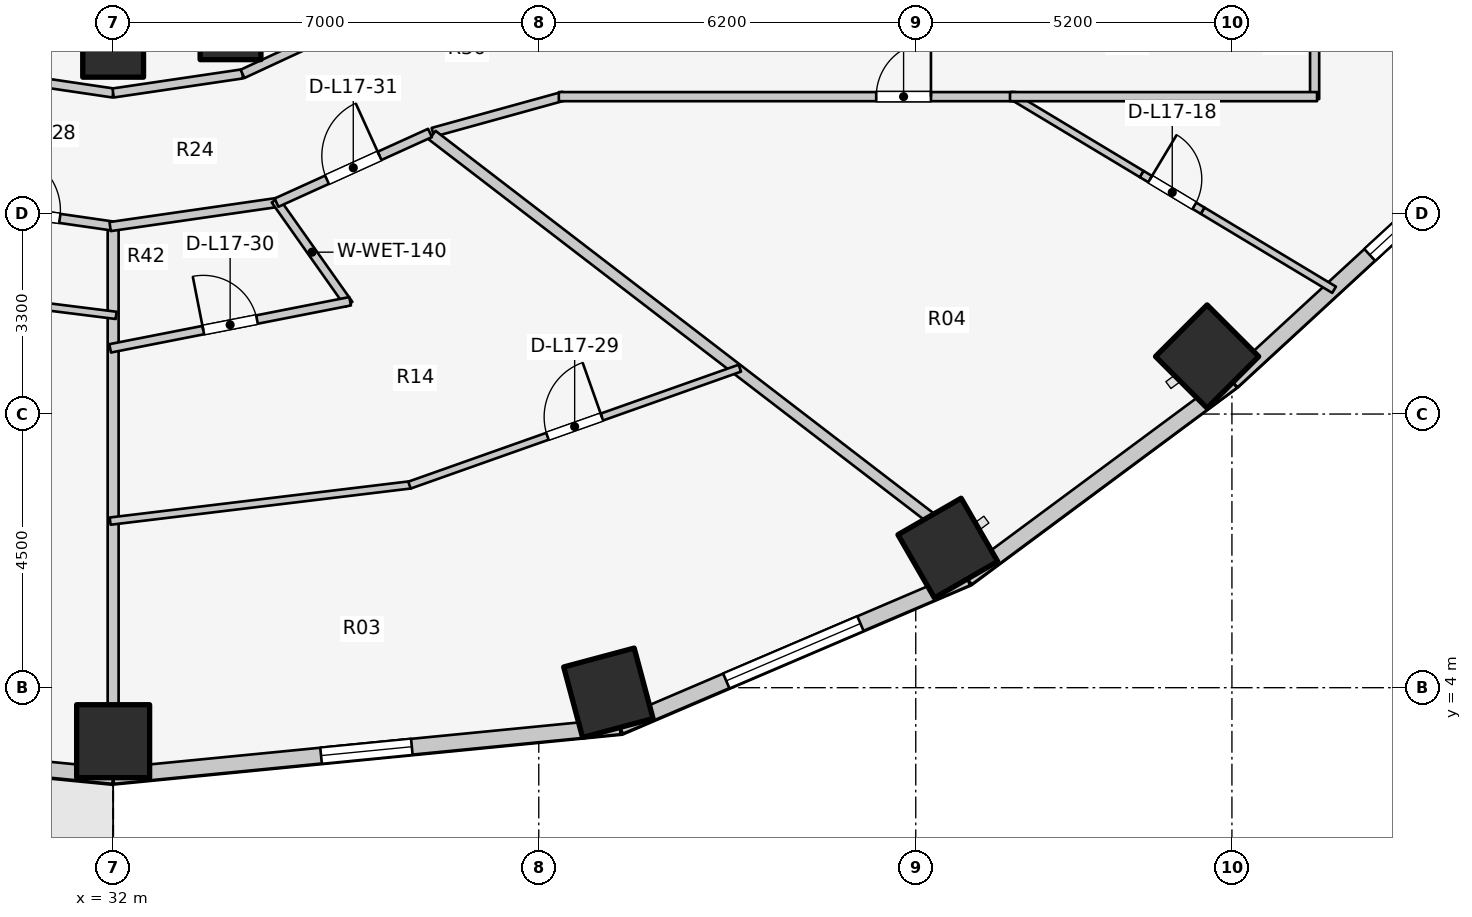
"""IFC4 building model, lengths in metres.
Left out: names, types, materials, properties, quantities, classifications, styles, units other than length and angle.
Written with IfcOpenShell. Run it as: python <this file> out.ifc"""

import sys

from ifc_helpers import new_model, si_unit, direction, frame, frame_2d, origin, origin_2d, place, context, subcontext, project, spatial, rectangle, extrude, element, fill, save


model = new_model("IFC4")
c1 = context("Model", 3, precision=1e-05, world=origin(), true_north=direction((0.0, 1.0)))
c2 = subcontext(c1, "Body", "Model", "MODEL_VIEW")
j1 = project(units=[si_unit("LENGTHUNIT", "METRE"), si_unit("PLANEANGLEUNIT", "RADIAN")], contexts=[c1])
p1 = place(None, origin())
s1 = spatial("IfcSite", under=j1, at=p1, CompositionType="ELEMENT")
p2 = place(p1, origin())
s2 = spatial("IfcBuilding", under=s1, at=p2, CompositionType="ELEMENT")
p3 = place(p2, frame((0.0, 0.0, 58.6)))
s3 = spatial("IfcBuildingStorey", under=s2, at=p3, CompositionType="ELEMENT", Elevation=58.6)
p4 = place(p3, frame((32.0, 14.54, 0.0), z_axis=(0.0, 0.0, 1.0), x_axis=(1.0, 0.0, 0.0)))
e1 = element("IfcColumn", 1, at=p4, inside=s3, PredefinedType="COLUMN", context=c2, shape_type="SweptSolid", body=[
    extrude(rectangle(XDim=1.0, YDim=1.0, at=origin_2d()), origin(), (0.0, 0.0, 1.0), 3.1),
])
p5 = place(p3, frame((32.0, 3.12, 0.0), z_axis=(0.0, 0.0, 1.0), x_axis=(0.0, -1.0, 0.0)))
e2 = element("IfcColumn", 2, at=p5, inside=s3, PredefinedType="COLUMN", context=c2, shape_type="SweptSolid", body=[
    extrude(rectangle(XDim=1.2, YDim=1.2, at=origin_2d()), origin(), (0.0, 0.0, 1.0), 3.1),
])
p6 = place(p3, frame((33.931, 14.828, 0.0), z_axis=(0.0, 0.0, 1.0), x_axis=(1.0, 0.0, 0.0)))
e3 = element("IfcColumn", 3, at=p6, inside=s3, PredefinedType="COLUMN", context=c2, shape_type="SweptSolid", body=[
    extrude(rectangle(XDim=1.0, YDim=1.0, at=origin_2d()), origin(), (0.0, 0.0, 1.0), 3.1),
])
for number, where, z_axis, x_axis in (
    (4, (40.145, 3.916, 0.0), (0.0, 0.0, 1.0), (0.259, -0.966, 0.0)),
    (5, (45.727, 6.296, 0.0), (0.0, 0.0, 1.0), (0.5, -0.866, 0.0)),
    (6, (49.992, 9.446, 0.0), (0.0, 0.0, 1.0), (0.707, -0.707, 0.0)),
):
    element("IfcColumn", number, at=place(p3, frame(where, z_axis=z_axis, x_axis=x_axis)), inside=s3, PredefinedType="COLUMN", context=c2, shape_type="SweptSolid", body=[
        extrude(rectangle(XDim=1.2, YDim=1.2, at=origin_2d()), origin(), (0.0, 0.0, 1.0), 3.1),
    ])
p7 = place(p3, frame((23.668, 3.364, 0.0), z_axis=(0.0, 0.0, 1.0), x_axis=(0.995247718352, -0.097375454379, 0.0)))
e7 = element("IfcWall", 7, at=p7, inside=s3, PredefinedType="STANDARD", context=c2, shape_type="SweptSolid", body=[
    extrude(rectangle(XDim=8.372, YDim=0.26, at=frame_2d((4.186, 0.0))), origin(), (0.0, 0.0, 1.0), 2.88),
])
p8 = place(p7, frame((3.586, 0.0, 0.0)))
e8 = element("IfcOpeningElement", 8, at=p8, cuts=e7, PredefinedType="OPENING", context=c2, shape_type="SweptSolid", body=[
    extrude(rectangle(XDim=1.2, YDim=2.2, at=frame_2d((0.6, 1.1))), frame((0.0, 0.14, 0.0), z_axis=(0.0, -1.0, 0.0), x_axis=(1.0, 0.0, 0.0)), (0.0, 0.0, 1.0), 0.28),
])
p9 = place(p3, frame((32.0, 2.549, 0.0), z_axis=(0.0, 0.0, 1.0), x_axis=(0.995247718352, 0.097375454379, 0.0)))
e9 = element("IfcWall", 9, at=p9, inside=s3, PredefinedType="STANDARD", context=c2, shape_type="SweptSolid", body=[
    extrude(rectangle(XDim=8.372, YDim=0.26, at=frame_2d((4.186, 0.0))), origin(), (0.0, 0.0, 1.0), 2.85),
])
p10 = place(p9, frame((3.436, 0.0, 0.75)))
e10 = element("IfcOpeningElement", 10, at=p10, cuts=e9, PredefinedType="OPENING", context=c2, shape_type="SweptSolid", body=[
    extrude(rectangle(XDim=1.5, YDim=1.6, at=frame_2d((0.75, 0.8))), frame((0.0, 0.14, 0.0), z_axis=(0.0, -1.0, 0.0), x_axis=(1.0, 0.0, 0.0)), (0.0, 0.0, 1.0), 0.28),
])
p11 = place(p3, frame((40.332, 3.364, 0.0), z_axis=(0.0, 0.0, 1.0), x_axis=(0.919612132394, 0.39282760335, 0.0)))
e11 = element("IfcWall", 11, at=p11, inside=s3, PredefinedType="STANDARD", context=c2, shape_type="SweptSolid", body=[
    extrude(rectangle(XDim=6.209, YDim=0.26, at=frame_2d((3.105, 0.0))), origin(), (0.0, 0.0, 1.0), 2.85),
])
p12 = place(p11, frame((1.905, 0.0, 0.75)))
e12 = element("IfcOpeningElement", 12, at=p12, cuts=e11, PredefinedType="OPENING", context=c2, shape_type="SweptSolid", body=[
    extrude(rectangle(XDim=2.4, YDim=1.7, at=frame_2d((1.2, 0.85))), frame((0.0, 0.14, 0.0), z_axis=(0.0, -1.0, 0.0), x_axis=(1.0, 0.0, 0.0)), (0.0, 0.0, 1.0), 0.28),
])
p13 = place(p3, frame((46.042, 5.803, 0.0), z_axis=(0.0, 0.0, 1.0), x_axis=(0.803477531792, 0.595335078679, 0.0)))
e13 = element("IfcWall", 13, at=p13, inside=s3, PredefinedType="STANDARD", context=c2, shape_type="SweptSolid", body=[
    extrude(rectangle(XDim=5.43, YDim=0.26, at=frame_2d((2.715, 0.0))), origin(), (0.0, 0.0, 1.0), 2.85),
])
p14 = place(p3, frame((50.405, 9.035, 0.0), z_axis=(0.0, 0.0, 1.0), x_axis=(0.735655109293, 0.67735630223, 0.0)))
e14 = element("IfcWall", 14, at=p14, inside=s3, PredefinedType="STANDARD", context=c2, shape_type="SweptSolid", body=[
    extrude(rectangle(XDim=5.151, YDim=0.26, at=frame_2d((2.575, 0.0))), origin(), (0.0, 0.0, 1.0), 2.85),
])
p15 = place(p14, frame((3.074, 0.0, 0.75)))
e15 = element("IfcOpeningElement", 15, at=p15, cuts=e14, PredefinedType="OPENING", context=c2, shape_type="SweptSolid", body=[
    extrude(rectangle(XDim=1.2, YDim=1.5, at=frame_2d((0.6, 0.75))), frame((0.0, 0.14, 0.0), z_axis=(0.0, -1.0, 0.0), x_axis=(1.0, 0.0, 0.0)), (0.0, 0.0, 1.0), 0.28),
])
for number, where, z_axis, x_axis in (
    (16, (29.873, 14.094, 0.0), (0.0, 0.0, 1.0), (0.989, -0.146, 0.0)),
    (17, (32.0, 13.78, 0.0), (0.0, 0.0, 1.0), (0.989, 0.146, 0.0)),
):
    element("IfcWall", number, at=place(p3, frame(where, z_axis=z_axis, x_axis=x_axis)), inside=s3, PredefinedType="PARTITIONING", context=c2, shape_type="SweptSolid", body=[
        extrude(rectangle(XDim=2.151, YDim=0.15, at=frame_2d((1.075, 0.0))), origin(), (0.0, 0.0, 1.0), 2.237),
    ])
p16 = place(p3, frame((34.127, 14.094, 0.0), z_axis=(0.0, 0.0, 1.0), x_axis=(0.906943449489, 0.421252393975, 0.0)))
e18 = element("IfcWall", 18, at=p16, inside=s3, PredefinedType="PARTITIONING", context=c2, shape_type="SweptSolid", body=[
    extrude(rectangle(XDim=2.186, YDim=0.15, at=frame_2d((1.093, 0.0))), origin(), (0.0, 0.0, 1.0), 2.237),
])
p17 = place(p3, frame((51.76, 13.68, 0.0), z_axis=(0.0, 0.0, 1.0), x_axis=(0.0, 1.0, 0.0)))
e19 = element("IfcWall", 19, at=p17, inside=s3, PredefinedType="PARTITIONING", context=c2, shape_type="SweptSolid", body=[
    extrude(rectangle(XDim=3.148, YDim=0.15, at=frame_2d((1.574, 0.0))), origin(), (0.0, 0.0, 1.0), 2.855),
])
p18 = place(p3, frame((46.757, 13.746, 0.0), z_axis=(0.0, 0.0, 1.0), x_axis=(0.856885623316, -0.515506574696, 0.0)))
e20 = element("IfcWall", 20, at=p18, inside=s3, PredefinedType="MOVABLE", context=c2, shape_type="SweptSolid", body=[
    extrude(rectangle(XDim=2.521, YDim=0.12, at=frame_2d((1.26, 0.0))), origin(), (0.0, 0.0, 1.0), 2.855),
])
p19 = place(p3, frame((48.917, 12.446, 0.0), z_axis=(0.0, 0.0, 1.0), x_axis=(0.856958544896, -0.515385343534, 0.0)))
e21 = element("IfcWall", 21, at=p19, inside=s3, PredefinedType="MOVABLE", context=c2, shape_type="SweptSolid", body=[
    extrude(rectangle(XDim=1.17, YDim=0.12, at=frame_2d((0.585, 0.0))), origin(), (0.0, 0.0, 1.0), 2.11),
])
p20 = place(p19, frame((0.16, 0.0, 0.0)))
e22 = element("IfcOpeningElement", 22, at=p20, cuts=e21, PredefinedType="OPENING", context=c2, shape_type="SweptSolid", body=[
    extrude(rectangle(XDim=0.85, YDim=2.05, at=frame_2d((0.425, 1.025))), frame((0.0, 0.07, 0.0), z_axis=(0.0, -1.0, 0.0), x_axis=(1.0, 0.0, 0.0)), (0.0, 0.0, 1.0), 0.14),
])
p21 = place(p3, frame((49.92, 11.843, 0.0), z_axis=(0.0, 0.0, 1.0), x_axis=(0.856902668222, -0.515478241243, 0.0)))
e23 = element("IfcWall", 23, at=p21, inside=s3, PredefinedType="MOVABLE", context=c2, shape_type="SweptSolid", body=[
    extrude(rectangle(XDim=2.521, YDim=0.12, at=frame_2d((1.26, 0.0))), origin(), (0.0, 0.0, 1.0), 2.855),
])
p22 = place(p3, frame((37.258, 13.133, 0.0), z_axis=(0.0, 0.0, 1.0), x_axis=(0.963833843713, 0.266503886865, 0.0)))
e24 = element("IfcWall", 24, at=p22, inside=s3, PredefinedType="PARTITIONING", context=c2, shape_type="SweptSolid", body=[
    extrude(rectangle(XDim=2.232, YDim=0.15, at=frame_2d((1.116, 0.0))), origin(), (0.0, 0.0, 1.0), 2.237),
])
p23 = place(p3, frame((39.33, 13.72, 0.0), z_axis=(0.0, 0.0, 1.0), x_axis=(1.0, 0.0, 0.0)))
e25 = element("IfcWall", 25, at=p23, inside=s3, PredefinedType="PARTITIONING", context=c2, shape_type="SweptSolid", body=[
    extrude(rectangle(XDim=7.52, YDim=0.15, at=frame_2d((3.76, 0.0))), origin(), (0.0, 0.0, 1.0), 2.237),
])
p24 = place(p23, frame((5.22, 0.0, 0.0)))
e26 = element("IfcOpeningElement", 26, at=p24, cuts=e25, PredefinedType="OPENING", context=c2, shape_type="SweptSolid", body=[
    extrude(rectangle(XDim=0.9, YDim=2.1, at=frame_2d((0.45, 1.05))), frame((0.0, 0.085, 0.0), z_axis=(0.0, -1.0, 0.0), x_axis=(1.0, 0.0, 0.0)), (0.0, 0.0, 1.0), 0.17),
])
p25 = place(p3, frame((46.75, 13.72, 0.0), z_axis=(0.0, 0.0, 1.0), x_axis=(1.0, 0.0, 0.0)))
e27 = element("IfcWall", 27, at=p25, inside=s3, PredefinedType="PARTITIONING", context=c2, shape_type="SweptSolid", body=[
    extrude(rectangle(XDim=5.05, YDim=0.15, at=frame_2d((2.525, 0.0))), origin(), (0.0, 0.0, 1.0), 2.069),
])
p26 = place(p3, frame((32.0, 11.535, 0.0), z_axis=(0.0, 0.0, 1.0), x_axis=(0.0, -1.0, 0.0)))
e28 = element("IfcWall", 28, at=p26, inside=s3, PredefinedType="PARTITIONING", context=c2, shape_type="SweptSolid", body=[
    extrude(rectangle(XDim=7.835, YDim=0.18, at=frame_2d((3.917, 0.0))), origin(), (0.0, 0.0, 1.0), 2.237),
])
p27 = place(p3, frame((37.249, 13.085, 0.0), z_axis=(0.0, 0.0, 1.0), x_axis=(0.793181014702, -0.608985942298, 0.0)))
e29 = element("IfcWall", 29, at=p27, inside=s3, PredefinedType="PARTITIONING", context=c2, shape_type="SweptSolid", body=[
    extrude(rectangle(XDim=10.324, YDim=0.18, at=frame_2d((5.162, 0.0))), origin(), (0.0, 0.0, 1.0), 2.237),
])
p28 = place(p3, frame((28.274, 10.596, 0.0), z_axis=(0.0, 0.0, 1.0), x_axis=(0.992245264378, -0.124295355177, 0.0)))
e30 = element("IfcWall", 30, at=p28, inside=s3, PredefinedType="MOVABLE", context=c2, shape_type="SweptSolid", body=[
    extrude(rectangle(XDim=3.805, YDim=0.12, at=frame_2d((1.902, 0.0))), origin(), (0.0, 0.0, 1.0), 2.237),
])
p29 = place(p28, frame((1.427, 0.0, 0.0)))
e31 = element("IfcOpeningElement", 31, at=p29, cuts=e30, PredefinedType="OPENING", context=c2, shape_type="SweptSolid", body=[
    extrude(rectangle(XDim=0.95, YDim=2.1, at=frame_2d((0.475, 1.05))), frame((0.0, 0.07, 0.0), z_axis=(0.0, -1.0, 0.0), x_axis=(1.0, 0.0, 0.0)), (0.0, 0.0, 1.0), 0.14),
])
p30 = place(p3, frame((29.299, 11.981, 0.0), z_axis=(0.0, 0.0, 1.0), x_axis=(0.989748682384, -0.142819976611, 0.0)))
e32 = element("IfcWall", 32, at=p30, inside=s3, PredefinedType="PARTITIONING", context=c2, shape_type="SweptSolid", body=[
    extrude(rectangle(XDim=2.737, YDim=0.15, at=frame_2d((1.368, 0.0))), origin(), (0.0, 0.0, 1.0), 2.237),
])
p31 = place(p30, frame((0.893, 0.0, 0.0)))
e33 = element("IfcOpeningElement", 33, at=p31, cuts=e32, PredefinedType="OPENING", context=c2, shape_type="SweptSolid", body=[
    extrude(rectangle(XDim=0.95, YDim=2.1, at=frame_2d((0.475, 1.05))), frame((0.0, 0.085, 0.0), z_axis=(0.0, -1.0, 0.0), x_axis=(1.0, 0.0, 0.0)), (0.0, 0.0, 1.0), 0.17),
])
p32 = place(p3, frame((31.95, 6.739, 0.0), z_axis=(0.0, 0.0, 1.0), x_axis=(0.992797021108, 0.11980849252, 0.0)))
e34 = element("IfcWall", 34, at=p32, inside=s3, PredefinedType="MOVABLE", context=c2, shape_type="SweptSolid", body=[
    extrude(rectangle(XDim=4.978, YDim=0.12, at=frame_2d((2.489, 0.0))), origin(), (0.0, 0.0, 1.0), 2.237),
])
p33 = place(p3, frame((36.874, 7.331, 0.0), z_axis=(0.0, 0.0, 1.0), x_axis=(0.942698294357, 0.333646408368, 0.0)))
e35 = element("IfcWall", 35, at=p33, inside=s3, PredefinedType="MOVABLE", context=c2, shape_type="SweptSolid", body=[
    extrude(rectangle(XDim=5.764, YDim=0.12, at=frame_2d((2.882, 0.0))), origin(), (0.0, 0.0, 1.0), 2.237),
])
p34 = place(p33, frame((2.407, 0.0, 0.0)))
e36 = element("IfcOpeningElement", 36, at=p34, cuts=e35, PredefinedType="OPENING", context=c2, shape_type="SweptSolid", body=[
    extrude(rectangle(XDim=0.95, YDim=2.1, at=frame_2d((0.475, 1.05))), frame((0.0, 0.07, 0.0), z_axis=(0.0, -1.0, 0.0), x_axis=(1.0, 0.0, 0.0)), (0.0, 0.0, 1.0), 0.14),
])
p35 = place(p3, frame((31.95, 11.583, 0.0), z_axis=(0.0, 0.0, 1.0), x_axis=(0.989761784218, 0.142729150844, 0.0)))
e37 = element("IfcWall", 37, at=p35, inside=s3, PredefinedType="PARTITIONING", context=c2, shape_type="SweptSolid", body=[
    extrude(rectangle(XDim=2.822, YDim=0.15, at=frame_2d((1.411, 0.0))), origin(), (0.0, 0.0, 1.0), 2.237),
])
p36 = place(p3, frame((34.665, 12.02, 0.0), z_axis=(0.0, 0.0, 1.0), x_axis=(0.577139575342, -0.816645523207, 0.0)))
e38 = element("IfcWall", 38, at=p36, inside=s3, PredefinedType="PLUMBINGWALL", context=c2, shape_type="SweptSolid", body=[
    extrude(rectangle(XDim=2.1, YDim=0.14, at=frame_2d((1.05, 0.0))), origin(), (0.0, 0.0, 1.0), 2.855),
])
p37 = place(p3, frame((31.951, 9.58, 0.0), z_axis=(0.0, 0.0, 1.0), x_axis=(0.981274848728, 0.19261274946, 0.0)))
e39 = element("IfcWall", 39, at=p37, inside=s3, PredefinedType="PLUMBINGWALL", context=c2, shape_type="SweptSolid", body=[
    extrude(rectangle(XDim=4.022, YDim=0.14, at=frame_2d((2.011, 0.0))), origin(), (0.0, 0.0, 1.0), 2.237),
])
p38 = place(p37, frame((1.561, 0.0, 0.0)))
e40 = element("IfcOpeningElement", 40, at=p38, cuts=e39, PredefinedType="OPENING", context=c2, shape_type="SweptSolid", body=[
    extrude(rectangle(XDim=0.9, YDim=2.1, at=frame_2d((0.45, 1.05))), frame((0.0, 0.08, 0.0), z_axis=(0.0, -1.0, 0.0), x_axis=(1.0, 0.0, 0.0)), (0.0, 0.0, 1.0), 0.16),
])
p39 = place(p3, frame((34.687, 11.977, 0.0), z_axis=(0.0, 0.0, 1.0), x_axis=(0.910568469686, 0.41335827319, 0.0)))
e41 = element("IfcWall", 41, at=p39, inside=s3, PredefinedType="PARTITIONING", context=c2, shape_type="SweptSolid", body=[
    extrude(rectangle(XDim=2.772, YDim=0.15, at=frame_2d((1.386, 0.0))), origin(), (0.0, 0.0, 1.0), 2.237),
])
p40 = place(p39, frame((0.911, 0.0, 0.0)))
e42 = element("IfcOpeningElement", 42, at=p40, cuts=e41, PredefinedType="OPENING", context=c2, shape_type="SweptSolid", body=[
    extrude(rectangle(XDim=0.95, YDim=2.1, at=frame_2d((0.475, 1.05))), frame((0.0, 0.085, 0.0), z_axis=(0.0, -1.0, 0.0), x_axis=(1.0, 0.0, 0.0)), (0.0, 0.0, 1.0), 0.17),
])
p41 = place(p10, origin())
e43 = element("IfcWindow", 43, at=p41, inside=s3, PartitioningType="SINGLE_PANEL", PredefinedType="WINDOW", context=c2, shape_type="SweptSolid", body=[
    extrude(rectangle(XDim=1.5, YDim=1.6, at=frame_2d((0.75, 0.8))), frame((0.0, 0.03, 0.0), z_axis=(0.0, -1.0, 0.0), x_axis=(1.0, 0.0, 0.0)), (0.0, 0.0, 1.0), 0.06),
])
fill(e10, e43)
p42 = place(p12, origin())
e44 = element("IfcWindow", 44, at=p42, inside=s3, PartitioningType="SINGLE_PANEL", PredefinedType="WINDOW", context=c2, shape_type="SweptSolid", body=[
    extrude(rectangle(XDim=2.4, YDim=1.7, at=frame_2d((1.2, 0.85))), frame((0.0, 0.03, 0.0), z_axis=(0.0, -1.0, 0.0), x_axis=(1.0, 0.0, 0.0)), (0.0, 0.0, 1.0), 0.06),
])
fill(e12, e44)
p43 = place(p15, origin())
e45 = element("IfcWindow", 45, at=p43, inside=s3, PartitioningType="SINGLE_PANEL", PredefinedType="WINDOW", context=c2, shape_type="SweptSolid", body=[
    extrude(rectangle(XDim=1.2, YDim=1.5, at=frame_2d((0.6, 0.75))), frame((0.0, 0.03, 0.0), z_axis=(0.0, -1.0, 0.0), x_axis=(1.0, 0.0, 0.0)), (0.0, 0.0, 1.0), 0.06),
])
fill(e15, e45)
p44 = place(p20, origin())
e46 = element("IfcDoor", 46, at=p44, inside=s3, OperationType="SINGLE_SWING_LEFT", PredefinedType="DOOR", context=c2, shape_type="SweptSolid", body=[
    extrude(rectangle(XDim=0.85, YDim=2.05, at=frame_2d((0.425, 1.025))), frame((0.0, 0.025, 0.0), z_axis=(0.0, -1.0, 0.0), x_axis=(1.0, 0.0, 0.0)), (0.0, 0.0, 1.0), 0.05),
])
fill(e22, e46)
p45 = place(p24, origin())
e47 = element("IfcDoor", 47, at=p45, inside=s3, OperationType="SINGLE_SWING_RIGHT", PredefinedType="DOOR", context=c2, shape_type="SweptSolid", body=[
    extrude(rectangle(XDim=0.9, YDim=2.1, at=frame_2d((0.45, 1.05))), frame((0.0, 0.025, 0.0), z_axis=(0.0, -1.0, 0.0), x_axis=(1.0, 0.0, 0.0)), (0.0, 0.0, 1.0), 0.05),
])
fill(e26, e47)
p46 = place(p31, origin())
e48 = element("IfcDoor", 48, at=p46, inside=s3, OperationType="SINGLE_SWING_LEFT", PredefinedType="DOOR", context=c2, shape_type="SweptSolid", body=[
    extrude(rectangle(XDim=0.95, YDim=2.1, at=frame_2d((0.475, 1.05))), frame((0.0, 0.025, 0.0), z_axis=(0.0, -1.0, 0.0), x_axis=(1.0, 0.0, 0.0)), (0.0, 0.0, 1.0), 0.05),
])
fill(e33, e48)
p47 = place(p34, origin())
e49 = element("IfcDoor", 49, at=p47, inside=s3, OperationType="SINGLE_SWING_RIGHT", PredefinedType="DOOR", context=c2, shape_type="SweptSolid", body=[
    extrude(rectangle(XDim=0.95, YDim=2.1, at=frame_2d((0.475, 1.05))), frame((0.0, 0.025, 0.0), z_axis=(0.0, -1.0, 0.0), x_axis=(1.0, 0.0, 0.0)), (0.0, 0.0, 1.0), 0.05),
])
fill(e36, e49)
p48 = place(p38, origin())
e50 = element("IfcDoor", 50, at=p48, inside=s3, OperationType="SINGLE_SWING_LEFT", PredefinedType="DOOR", context=c2, shape_type="SweptSolid", body=[
    extrude(rectangle(XDim=0.9, YDim=2.1, at=frame_2d((0.45, 1.05))), frame((0.0, 0.025, 0.0), z_axis=(0.0, -1.0, 0.0), x_axis=(1.0, 0.0, 0.0)), (0.0, 0.0, 1.0), 0.05),
])
fill(e40, e50)
p49 = place(p40, origin())
e51 = element("IfcDoor", 51, at=p49, inside=s3, OperationType="SINGLE_SWING_RIGHT", PredefinedType="DOOR", context=c2, shape_type="SweptSolid", body=[
    extrude(rectangle(XDim=0.95, YDim=2.1, at=frame_2d((0.475, 1.05))), frame((0.0, 0.025, 0.0), z_axis=(0.0, -1.0, 0.0), x_axis=(1.0, 0.0, 0.0)), (0.0, 0.0, 1.0), 0.05),
])
fill(e42, e51)
save(model, sys.argv[1])
